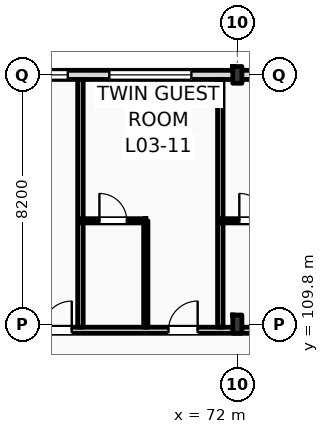
"""IFC4 building model, lengths in metres.
Left out: names, types, materials, properties, quantities, classifications, styles, units other than length and angle.
Written with IfcOpenShell. Run it as: python <this file> out.ifc"""

import sys

from ifc_helpers import new_model, si_unit, direction, frame, frame_2d, origin, origin_2d, place, context, subcontext, project, spatial, rectangle, i_section, extrude, element, fill, save


model = new_model("IFC4")
c1 = context("Model", 3, precision=1e-05, world=origin(), true_north=direction((0.0, 1.0)))
c2 = subcontext(c1, "Body", "Model", "MODEL_VIEW")
j1 = project(units=[si_unit("LENGTHUNIT", "METRE"), si_unit("PLANEANGLEUNIT", "RADIAN")], contexts=[c1])
p1 = place(None, origin())
s1 = spatial("IfcSite", under=j1, at=p1, CompositionType="ELEMENT")
p2 = place(p1, origin())
s2 = spatial("IfcBuilding", under=s1, at=p2, CompositionType="ELEMENT")
p3 = place(p2, frame((0.0, 0.0, 16.2)))
s3 = spatial("IfcBuildingStorey", under=s2, at=p3, CompositionType="ELEMENT", Elevation=16.2)
p4 = place(p3, frame((72.0, 109.8, 0.0), z_axis=(0.0, 0.0, 1.0), x_axis=(1.0, 0.0, 0.0)))
e1 = element("IfcColumn", 1, at=p4, inside=s3, PredefinedType="COLUMN", context=c2, shape_type="SweptSolid", body=[
    extrude(i_section(OverallWidth=0.3, OverallDepth=0.6, WebThickness=0.015, FlangeThickness=0.03, FilletRadius=0.027, at=origin_2d()), origin(), (0.0, 0.0, 1.0), 4.2),
])
p5 = place(p3, frame((72.0, 118.0, 0.0), z_axis=(0.0, 0.0, 1.0), x_axis=(1.0, 0.0, 0.0)))
e2 = element("IfcColumn", 2, at=p5, inside=s3, PredefinedType="COLUMN", context=c2, shape_type="SweptSolid", body=[
    extrude(i_section(OverallWidth=0.3, OverallDepth=0.55, WebThickness=0.015, FlangeThickness=0.029, FilletRadius=0.027, at=origin_2d()), origin(), (0.0, 0.0, 1.0), 4.2),
])
p6 = place(p3, frame((22.5, 118.0, 0.0), z_axis=(0.0, 0.0, 1.0), x_axis=(1.0, 0.0, 0.0)))
e3 = element("IfcWall", 3, at=p6, inside=s3, PredefinedType="STANDARD", context=c2, shape_type="SweptSolid", body=[
    extrude(rectangle(XDim=97.5, YDim=0.3, at=frame_2d((48.75, 0.0))), origin(), (0.0, 0.0, 1.0), 3.36),
])
p7 = place(p6, frame((3.721, 0.0, 0.9)))
e4 = element("IfcOpeningElement", 4, at=p7, cuts=e3, PredefinedType="OPENING", context=c2, shape_type="SweptSolid", body=[
    extrude(rectangle(XDim=0.9, YDim=1.8, at=frame_2d((0.45, 0.9))), frame((0.0, 0.16, 0.0), z_axis=(0.0, -1.0, 0.0), x_axis=(1.0, 0.0, 0.0)), (0.0, 0.0, 1.0), 0.32),
])
p8 = place(p6, frame((6.447, 0.0, 0.9)))
e5 = element("IfcOpeningElement", 5, at=p8, cuts=e3, PredefinedType="OPENING", context=c2, shape_type="SweptSolid", body=[
    extrude(rectangle(XDim=1.35, YDim=1.85, at=frame_2d((0.675, 0.925))), frame((0.0, 0.16, 0.0), z_axis=(0.0, -1.0, 0.0), x_axis=(1.0, 0.0, 0.0)), (0.0, 0.0, 1.0), 0.32),
])
p9 = place(p6, frame((11.363, 0.0, 0.9)))
e6 = element("IfcOpeningElement", 6, at=p9, cuts=e3, PredefinedType="OPENING", context=c2, shape_type="SweptSolid", body=[
    extrude(rectangle(XDim=1.5, YDim=1.9, at=frame_2d((0.75, 0.95))), frame((0.0, 0.16, 0.0), z_axis=(0.0, -1.0, 0.0), x_axis=(1.0, 0.0, 0.0)), (0.0, 0.0, 1.0), 0.32),
])
p10 = place(p6, frame((15.078, 0.0, 0.9)))
e7 = element("IfcOpeningElement", 7, at=p10, cuts=e3, PredefinedType="OPENING", context=c2, shape_type="SweptSolid", body=[
    extrude(rectangle(XDim=1.65, YDim=1.95, at=frame_2d((0.825, 0.975))), frame((0.0, 0.16, 0.0), z_axis=(0.0, -1.0, 0.0), x_axis=(1.0, 0.0, 0.0)), (0.0, 0.0, 1.0), 0.32),
])
p11 = place(p6, frame((19.395, 0.0, 0.9)))
e8 = element("IfcOpeningElement", 8, at=p11, cuts=e3, PredefinedType="OPENING", context=c2, shape_type="SweptSolid", body=[
    extrude(rectangle(XDim=1.8, YDim=2.0, at=frame_2d((0.9, 1.0))), frame((0.0, 0.16, 0.0), z_axis=(0.0, -1.0, 0.0), x_axis=(1.0, 0.0, 0.0)), (0.0, 0.0, 1.0), 0.32),
])
p12 = place(p6, frame((23.31, 0.0, 0.9)))
e9 = element("IfcOpeningElement", 9, at=p12, cuts=e3, PredefinedType="OPENING", context=c2, shape_type="SweptSolid", body=[
    extrude(rectangle(XDim=1.95, YDim=2.05, at=frame_2d((0.975, 1.025))), frame((0.0, 0.16, 0.0), z_axis=(0.0, -1.0, 0.0), x_axis=(1.0, 0.0, 0.0)), (0.0, 0.0, 1.0), 0.32),
])
p13 = place(p6, frame((28.026, 0.0, 0.9)))
e10 = element("IfcOpeningElement", 10, at=p13, cuts=e3, PredefinedType="OPENING", context=c2, shape_type="SweptSolid", body=[
    extrude(rectangle(XDim=2.1, YDim=2.1, at=frame_2d((1.05, 1.05))), frame((0.0, 0.16, 0.0), z_axis=(0.0, -1.0, 0.0), x_axis=(1.0, 0.0, 0.0)), (0.0, 0.0, 1.0), 0.32),
])
p14 = place(p6, frame((31.941, 0.0, 0.9)))
e11 = element("IfcOpeningElement", 11, at=p14, cuts=e3, PredefinedType="OPENING", context=c2, shape_type="SweptSolid", body=[
    extrude(rectangle(XDim=1.1, YDim=2.15, at=frame_2d((0.55, 1.075))), frame((0.0, 0.16, 0.0), z_axis=(0.0, -1.0, 0.0), x_axis=(1.0, 0.0, 0.0)), (0.0, 0.0, 1.0), 0.32),
])
p15 = place(p6, frame((36.657, 0.0, 0.9)))
e12 = element("IfcOpeningElement", 12, at=p15, cuts=e3, PredefinedType="OPENING", context=c2, shape_type="SweptSolid", body=[
    extrude(rectangle(XDim=2.4, YDim=2.2, at=frame_2d((1.2, 1.1))), frame((0.0, 0.16, 0.0), z_axis=(0.0, -1.0, 0.0), x_axis=(1.0, 0.0, 0.0)), (0.0, 0.0, 1.0), 0.32),
])
p16 = place(p6, frame((42.574, 0.0, 0.9)))
e13 = element("IfcOpeningElement", 13, at=p16, cuts=e3, PredefinedType="OPENING", context=c2, shape_type="SweptSolid", body=[
    extrude(rectangle(XDim=1.35, YDim=2.25, at=frame_2d((0.675, 1.125))), frame((0.0, 0.16, 0.0), z_axis=(0.0, -1.0, 0.0), x_axis=(1.0, 0.0, 0.0)), (0.0, 0.0, 1.0), 0.32),
])
p17 = place(p6, frame((45.289, 0.0, 0.9)))
e14 = element("IfcOpeningElement", 14, at=p17, cuts=e3, PredefinedType="OPENING", context=c2, shape_type="SweptSolid", body=[
    extrude(rectangle(XDim=2.7, YDim=2.28, at=frame_2d((1.35, 1.14))), frame((0.0, 0.16, 0.0), z_axis=(0.0, -1.0, 0.0), x_axis=(1.0, 0.0, 0.0)), (0.0, 0.0, 1.0), 0.32),
])
p18 = place(p6, frame((50.406, 0.0, 0.9)))
e15 = element("IfcOpeningElement", 15, at=p18, cuts=e3, PredefinedType="OPENING", context=c2, shape_type="SweptSolid", body=[
    extrude(rectangle(XDim=1.8, YDim=2.28, at=frame_2d((0.9, 1.14))), frame((0.0, 0.16, 0.0), z_axis=(0.0, -1.0, 0.0), x_axis=(1.0, 0.0, 0.0)), (0.0, 0.0, 1.0), 0.32),
])
p19 = place(p6, frame((53.922, 0.0, 0.9)))
e16 = element("IfcOpeningElement", 16, at=p19, cuts=e3, PredefinedType="OPENING", context=c2, shape_type="SweptSolid", body=[
    extrude(rectangle(XDim=1.8, YDim=2.28, at=frame_2d((0.9, 1.14))), frame((0.0, 0.16, 0.0), z_axis=(0.0, -1.0, 0.0), x_axis=(1.0, 0.0, 0.0)), (0.0, 0.0, 1.0), 0.32),
])
p20 = place(p6, frame((58.332, 0.0, 0.9)))
e17 = element("IfcOpeningElement", 17, at=p20, cuts=e3, PredefinedType="OPENING", context=c2, shape_type="SweptSolid", body=[
    extrude(rectangle(XDim=2.961, YDim=2.28, at=frame_2d((1.48, 1.14))), frame((0.0, 0.16, 0.0), z_axis=(0.0, -1.0, 0.0), x_axis=(1.0, 0.0, 0.0)), (0.0, 0.0, 1.0), 0.32),
])
p21 = place(p6, frame((62.513, 0.0, 0.9)))
e18 = element("IfcOpeningElement", 18, at=p21, cuts=e3, PredefinedType="OPENING", context=c2, shape_type="SweptSolid", body=[
    extrude(rectangle(XDim=1.8, YDim=2.28, at=frame_2d((0.9, 1.14))), frame((0.0, 0.16, 0.0), z_axis=(0.0, -1.0, 0.0), x_axis=(1.0, 0.0, 0.0)), (0.0, 0.0, 1.0), 0.32),
])
p22 = place(p6, frame((67.114, 0.0, 0.9)))
e19 = element("IfcOpeningElement", 19, at=p22, cuts=e3, PredefinedType="OPENING", context=c2, shape_type="SweptSolid", body=[
    extrude(rectangle(XDim=2.961, YDim=2.28, at=frame_2d((1.48, 1.14))), frame((0.0, 0.16, 0.0), z_axis=(0.0, -1.0, 0.0), x_axis=(1.0, 0.0, 0.0)), (0.0, 0.0, 1.0), 0.32),
])
p23 = place(p6, frame((73.695, 0.0, 0.9)))
e20 = element("IfcOpeningElement", 20, at=p23, cuts=e3, PredefinedType="OPENING", context=c2, shape_type="SweptSolid", body=[
    extrude(rectangle(XDim=1.1, YDim=2.28, at=frame_2d((0.55, 1.14))), frame((0.0, 0.16, 0.0), z_axis=(0.0, -1.0, 0.0), x_axis=(1.0, 0.0, 0.0)), (0.0, 0.0, 1.0), 0.32),
])
p24 = place(p6, frame((75.895, 0.0, 0.9)))
e21 = element("IfcOpeningElement", 21, at=p24, cuts=e3, PredefinedType="OPENING", context=c2, shape_type="SweptSolid", body=[
    extrude(rectangle(XDim=2.961, YDim=2.28, at=frame_2d((1.48, 1.14))), frame((0.0, 0.16, 0.0), z_axis=(0.0, -1.0, 0.0), x_axis=(1.0, 0.0, 0.0)), (0.0, 0.0, 1.0), 0.32),
])
p25 = place(p6, frame((81.676, 0.0, 0.9)))
e22 = element("IfcOpeningElement", 22, at=p25, cuts=e3, PredefinedType="OPENING", context=c2, shape_type="SweptSolid", body=[
    extrude(rectangle(XDim=1.8, YDim=2.28, at=frame_2d((0.9, 1.14))), frame((0.0, 0.16, 0.0), z_axis=(0.0, -1.0, 0.0), x_axis=(1.0, 0.0, 0.0)), (0.0, 0.0, 1.0), 0.32),
])
p26 = place(p6, frame((84.677, 0.0, 0.9)))
e23 = element("IfcOpeningElement", 23, at=p26, cuts=e3, PredefinedType="OPENING", context=c2, shape_type="SweptSolid", body=[
    extrude(rectangle(XDim=2.961, YDim=2.28, at=frame_2d((1.48, 1.14))), frame((0.0, 0.16, 0.0), z_axis=(0.0, -1.0, 0.0), x_axis=(1.0, 0.0, 0.0)), (0.0, 0.0, 1.0), 0.32),
])
p27 = place(p6, frame((89.999, 0.0, 0.9)))
e24 = element("IfcOpeningElement", 24, at=p27, cuts=e3, PredefinedType="OPENING", context=c2, shape_type="SweptSolid", body=[
    extrude(rectangle(XDim=1.1, YDim=1.5, at=frame_2d((0.55, 0.75))), frame((0.0, 0.16, 0.0), z_axis=(0.0, -1.0, 0.0), x_axis=(1.0, 0.0, 0.0)), (0.0, 0.0, 1.0), 0.32),
])
p28 = place(p6, frame((94.35, 0.0, 0.9)))
e25 = element("IfcOpeningElement", 25, at=p28, cuts=e3, PredefinedType="OPENING", context=c2, shape_type="SweptSolid", body=[
    extrude(rectangle(XDim=1.25, YDim=1.6, at=frame_2d((0.625, 0.8))), frame((0.0, 0.16, 0.0), z_axis=(0.0, -1.0, 0.0), x_axis=(1.0, 0.0, 0.0)), (0.0, 0.0, 1.0), 0.32),
])
p29 = place(p3, frame((10.65, 109.6, 0.0), z_axis=(0.0, 0.0, 1.0), x_axis=(1.0, 0.0, 0.0)))
e26 = element("IfcWall", 26, at=p29, inside=s3, PredefinedType="PARTITIONING", context=c2, shape_type="SweptSolid", body=[
    extrude(rectangle(XDim=109.21, YDim=0.2, at=frame_2d((54.605, 0.0))), origin(), (0.0, 0.0, 1.0), 3.36),
])
p30 = place(p29, frame((15.43, 0.0, 0.0)))
e27 = element("IfcOpeningElement", 27, at=p30, cuts=e26, PredefinedType="OPENING", context=c2, shape_type="SweptSolid", body=[
    extrude(rectangle(XDim=1.02, YDim=2.2, at=frame_2d((0.51, 1.1))), frame((0.0, 0.11, 0.0), z_axis=(0.0, -1.0, 0.0), x_axis=(1.0, 0.0, 0.0)), (0.0, 0.0, 1.0), 0.22),
])
p31 = place(p29, frame((19.537, 0.0, 0.0)))
e28 = element("IfcOpeningElement", 28, at=p31, cuts=e26, PredefinedType="OPENING", context=c2, shape_type="SweptSolid", body=[
    extrude(rectangle(XDim=1.02, YDim=2.2, at=frame_2d((0.51, 1.1))), frame((0.0, 0.11, 0.0), z_axis=(0.0, -1.0, 0.0), x_axis=(1.0, 0.0, 0.0)), (0.0, 0.0, 1.0), 0.22),
])
p32 = place(p29, frame((23.928, 0.0, 0.0)))
e29 = element("IfcOpeningElement", 29, at=p32, cuts=e26, PredefinedType="OPENING", context=c2, shape_type="SweptSolid", body=[
    extrude(rectangle(XDim=1.02, YDim=2.2, at=frame_2d((0.51, 1.1))), frame((0.0, 0.11, 0.0), z_axis=(0.0, -1.0, 0.0), x_axis=(1.0, 0.0, 0.0)), (0.0, 0.0, 1.0), 0.22),
])
p33 = place(p29, frame((26.169, 0.0, 0.0)))
e30 = element("IfcOpeningElement", 30, at=p33, cuts=e26, PredefinedType="OPENING", context=c2, shape_type="SweptSolid", body=[
    extrude(rectangle(XDim=1.02, YDim=2.2, at=frame_2d((0.51, 1.1))), frame((0.0, 0.11, 0.0), z_axis=(0.0, -1.0, 0.0), x_axis=(1.0, 0.0, 0.0)), (0.0, 0.0, 1.0), 0.22),
])
p34 = place(p29, frame((32.739, 0.0, 0.0)))
e31 = element("IfcOpeningElement", 31, at=p34, cuts=e26, PredefinedType="OPENING", context=c2, shape_type="SweptSolid", body=[
    extrude(rectangle(XDim=0.96, YDim=2.2, at=frame_2d((0.48, 1.1))), frame((0.0, 0.11, 0.0), z_axis=(0.0, -1.0, 0.0), x_axis=(1.0, 0.0, 0.0)), (0.0, 0.0, 1.0), 0.22),
])
p35 = place(p29, frame((34.98, 0.0, 0.0)))
e32 = element("IfcOpeningElement", 32, at=p35, cuts=e26, PredefinedType="OPENING", context=c2, shape_type="SweptSolid", body=[
    extrude(rectangle(XDim=0.96, YDim=2.2, at=frame_2d((0.48, 1.1))), frame((0.0, 0.11, 0.0), z_axis=(0.0, -1.0, 0.0), x_axis=(1.0, 0.0, 0.0)), (0.0, 0.0, 1.0), 0.22),
])
p36 = place(p29, frame((41.521, 0.0, 0.0)))
e33 = element("IfcOpeningElement", 33, at=p36, cuts=e26, PredefinedType="OPENING", context=c2, shape_type="SweptSolid", body=[
    extrude(rectangle(XDim=0.96, YDim=2.2, at=frame_2d((0.48, 1.1))), frame((0.0, 0.11, 0.0), z_axis=(0.0, -1.0, 0.0), x_axis=(1.0, 0.0, 0.0)), (0.0, 0.0, 1.0), 0.22),
])
p37 = place(p29, frame((43.512, 0.0, 0.0)))
e34 = element("IfcOpeningElement", 34, at=p37, cuts=e26, PredefinedType="OPENING", context=c2, shape_type="SweptSolid", body=[
    extrude(rectangle(XDim=0.96, YDim=2.2, at=frame_2d((0.48, 1.1))), frame((0.0, 0.11, 0.0), z_axis=(0.0, -1.0, 0.0), x_axis=(1.0, 0.0, 0.0)), (0.0, 0.0, 1.0), 0.22),
])
p38 = place(p29, frame((50.303, 0.0, 0.0)))
e35 = element("IfcOpeningElement", 35, at=p38, cuts=e26, PredefinedType="OPENING", context=c2, shape_type="SweptSolid", body=[
    extrude(rectangle(XDim=0.96, YDim=2.2, at=frame_2d((0.48, 1.1))), frame((0.0, 0.11, 0.0), z_axis=(0.0, -1.0, 0.0), x_axis=(1.0, 0.0, 0.0)), (0.0, 0.0, 1.0), 0.22),
])
p39 = place(p29, frame((54.944, 0.0, 0.0)))
e36 = element("IfcOpeningElement", 36, at=p39, cuts=e26, PredefinedType="OPENING", context=c2, shape_type="SweptSolid", body=[
    extrude(rectangle(XDim=0.96, YDim=2.2, at=frame_2d((0.48, 1.1))), frame((0.0, 0.11, 0.0), z_axis=(0.0, -1.0, 0.0), x_axis=(1.0, 0.0, 0.0)), (0.0, 0.0, 1.0), 0.22),
])
p40 = place(p29, frame((59.085, 0.0, 0.0)))
e37 = element("IfcOpeningElement", 37, at=p40, cuts=e26, PredefinedType="OPENING", context=c2, shape_type="SweptSolid", body=[
    extrude(rectangle(XDim=0.96, YDim=2.2, at=frame_2d((0.48, 1.1))), frame((0.0, 0.11, 0.0), z_axis=(0.0, -1.0, 0.0), x_axis=(1.0, 0.0, 0.0)), (0.0, 0.0, 1.0), 0.22),
])
p41 = place(p29, frame((63.476, 0.0, 0.0)))
e38 = element("IfcOpeningElement", 38, at=p41, cuts=e26, PredefinedType="OPENING", context=c2, shape_type="SweptSolid", body=[
    extrude(rectangle(XDim=0.96, YDim=2.2, at=frame_2d((0.48, 1.1))), frame((0.0, 0.11, 0.0), z_axis=(0.0, -1.0, 0.0), x_axis=(1.0, 0.0, 0.0)), (0.0, 0.0, 1.0), 0.22),
])
p42 = place(p29, frame((65.716, 0.0, 0.0)))
e39 = element("IfcOpeningElement", 39, at=p42, cuts=e26, PredefinedType="OPENING", context=c2, shape_type="SweptSolid", body=[
    extrude(rectangle(XDim=0.96, YDim=2.2, at=frame_2d((0.48, 1.1))), frame((0.0, 0.11, 0.0), z_axis=(0.0, -1.0, 0.0), x_axis=(1.0, 0.0, 0.0)), (0.0, 0.0, 1.0), 0.22),
])
p43 = place(p29, frame((72.257, 0.0, 0.0)))
e40 = element("IfcOpeningElement", 40, at=p43, cuts=e26, PredefinedType="OPENING", context=c2, shape_type="SweptSolid", body=[
    extrude(rectangle(XDim=0.96, YDim=2.2, at=frame_2d((0.48, 1.1))), frame((0.0, 0.11, 0.0), z_axis=(0.0, -1.0, 0.0), x_axis=(1.0, 0.0, 0.0)), (0.0, 0.0, 1.0), 0.22),
])
p44 = place(p29, frame((74.498, 0.0, 0.0)))
e41 = element("IfcOpeningElement", 41, at=p44, cuts=e26, PredefinedType="OPENING", context=c2, shape_type="SweptSolid", body=[
    extrude(rectangle(XDim=0.96, YDim=2.2, at=frame_2d((0.48, 1.1))), frame((0.0, 0.11, 0.0), z_axis=(0.0, -1.0, 0.0), x_axis=(1.0, 0.0, 0.0)), (0.0, 0.0, 1.0), 0.22),
])
p45 = place(p29, frame((81.039, 0.0, 0.0)))
e42 = element("IfcOpeningElement", 42, at=p45, cuts=e26, PredefinedType="OPENING", context=c2, shape_type="SweptSolid", body=[
    extrude(rectangle(XDim=0.96, YDim=2.2, at=frame_2d((0.48, 1.1))), frame((0.0, 0.11, 0.0), z_axis=(0.0, -1.0, 0.0), x_axis=(1.0, 0.0, 0.0)), (0.0, 0.0, 1.0), 0.22),
])
p46 = place(p29, frame((85.68, 0.0, 0.0)))
e43 = element("IfcOpeningElement", 43, at=p46, cuts=e26, PredefinedType="OPENING", context=c2, shape_type="SweptSolid", body=[
    extrude(rectangle(XDim=0.96, YDim=2.2, at=frame_2d((0.48, 1.1))), frame((0.0, 0.11, 0.0), z_axis=(0.0, -1.0, 0.0), x_axis=(1.0, 0.0, 0.0)), (0.0, 0.0, 1.0), 0.22),
])
p47 = place(p29, frame((89.82, 0.0, 0.0)))
e44 = element("IfcOpeningElement", 44, at=p47, cuts=e26, PredefinedType="OPENING", context=c2, shape_type="SweptSolid", body=[
    extrude(rectangle(XDim=0.96, YDim=2.2, at=frame_2d((0.48, 1.1))), frame((0.0, 0.11, 0.0), z_axis=(0.0, -1.0, 0.0), x_axis=(1.0, 0.0, 0.0)), (0.0, 0.0, 1.0), 0.22),
])
p48 = place(p29, frame((94.211, 0.0, 0.0)))
e45 = element("IfcOpeningElement", 45, at=p48, cuts=e26, PredefinedType="OPENING", context=c2, shape_type="SweptSolid", body=[
    extrude(rectangle(XDim=0.96, YDim=2.2, at=frame_2d((0.48, 1.1))), frame((0.0, 0.11, 0.0), z_axis=(0.0, -1.0, 0.0), x_axis=(1.0, 0.0, 0.0)), (0.0, 0.0, 1.0), 0.22),
])
p49 = place(p29, frame((98.602, 0.0, 0.0)))
e46 = element("IfcOpeningElement", 46, at=p49, cuts=e26, PredefinedType="OPENING", context=c2, shape_type="SweptSolid", body=[
    extrude(rectangle(XDim=0.96, YDim=2.2, at=frame_2d((0.48, 1.1))), frame((0.0, 0.11, 0.0), z_axis=(0.0, -1.0, 0.0), x_axis=(1.0, 0.0, 0.0)), (0.0, 0.0, 1.0), 0.22),
])
p50 = place(p29, frame((102.993, 0.0, 0.0)))
e47 = element("IfcOpeningElement", 47, at=p50, cuts=e26, PredefinedType="OPENING", context=c2, shape_type="SweptSolid", body=[
    extrude(rectangle(XDim=0.96, YDim=2.2, at=frame_2d((0.48, 1.1))), frame((0.0, 0.11, 0.0), z_axis=(0.0, -1.0, 0.0), x_axis=(1.0, 0.0, 0.0)), (0.0, 0.0, 1.0), 0.22),
])
p51 = place(p29, frame((105.269, 0.0, 0.0)))
e48 = element("IfcOpeningElement", 48, at=p51, cuts=e26, PredefinedType="OPENING", context=c2, shape_type="SweptSolid", body=[
    extrude(rectangle(XDim=0.96, YDim=2.2, at=frame_2d((0.48, 1.1))), frame((0.0, 0.11, 0.0), z_axis=(0.0, -1.0, 0.0), x_axis=(1.0, 0.0, 0.0)), (0.0, 0.0, 1.0), 0.22),
])
p52 = place(p29, frame((2.716, 0.0, 0.0)))
e49 = element("IfcOpeningElement", 49, at=p52, cuts=e26, PredefinedType="OPENING", context=c2, shape_type="SweptSolid", body=[
    extrude(rectangle(XDim=1.35, YDim=2.25, at=frame_2d((0.675, 1.125))), frame((0.0, 0.11, 0.0), z_axis=(0.0, -1.0, 0.0), x_axis=(1.0, 0.0, 0.0)), (0.0, 0.0, 1.0), 0.22),
])
p53 = place(p29, frame((6.65, 0.0, 0.0)))
e50 = element("IfcOpeningElement", 50, at=p53, cuts=e26, PredefinedType="OPENING", context=c2, shape_type="SweptSolid", body=[
    extrude(rectangle(XDim=1.35, YDim=2.25, at=frame_2d((0.675, 1.125))), frame((0.0, 0.11, 0.0), z_axis=(0.0, -1.0, 0.0), x_axis=(1.0, 0.0, 0.0)), (0.0, 0.0, 1.0), 0.22),
])
p54 = place(p29, frame((10.583, 0.0, 0.0)))
e51 = element("IfcOpeningElement", 51, at=p54, cuts=e26, PredefinedType="OPENING", context=c2, shape_type="SweptSolid", body=[
    extrude(rectangle(XDim=1.35, YDim=2.25, at=frame_2d((0.675, 1.125))), frame((0.0, 0.11, 0.0), z_axis=(0.0, -1.0, 0.0), x_axis=(1.0, 0.0, 0.0)), (0.0, 0.0, 1.0), 0.22),
])
p55 = place(p3, frame((66.839, 109.7, 0.0), z_axis=(0.0, 0.0, 1.0), x_axis=(0.0, 1.0, 0.0)))
e52 = element("IfcWall", 52, at=p55, inside=s3, PredefinedType="PARTITIONING", context=c2, shape_type="SweptSolid", body=[
    extrude(rectangle(XDim=8.15, YDim=0.18, at=frame_2d((4.075, 0.0))), origin(), (0.0, 0.0, 1.0), 3.61),
])
p56 = place(p3, frame((71.44, 109.7, 0.0), z_axis=(0.0, 0.0, 1.0), x_axis=(0.0, 1.0, 0.0)))
e53 = element("IfcWall", 53, at=p56, inside=s3, PredefinedType="PARTITIONING", context=c2, shape_type="SweptSolid", body=[
    extrude(rectangle(XDim=8.15, YDim=0.18, at=frame_2d((4.075, 0.0))), origin(), (0.0, 0.0, 1.0), 3.92),
])
p57 = place(p3, frame((68.989, 109.7, 0.0), z_axis=(0.0, 0.0, 1.0), x_axis=(0.0, 1.0, 0.0)))
e54 = element("IfcWall", 54, at=p57, inside=s3, PredefinedType="PARTITIONING", context=c2, shape_type="SweptSolid", body=[
    extrude(rectangle(XDim=3.5, YDim=0.14, at=frame_2d((1.75, 0.0))), origin(), (0.0, 0.0, 1.0), 3.92),
])
p58 = place(p3, frame((66.839, 113.2, 0.0), z_axis=(0.0, 0.0, 1.0), x_axis=(1.0, 0.0, 0.0)))
e55 = element("IfcWall", 55, at=p58, inside=s3, PredefinedType="PARTITIONING", context=c2, shape_type="SweptSolid", body=[
    extrude(rectangle(XDim=2.15, YDim=0.14, at=frame_2d((1.075, 0.0))), origin(), (0.0, 0.0, 1.0), 3.92),
])
p59 = place(p58, frame((0.625, 0.0, 0.0)))
e56 = element("IfcOpeningElement", 56, at=p59, cuts=e55, PredefinedType="OPENING", context=c2, shape_type="SweptSolid", body=[
    extrude(rectangle(XDim=0.9, YDim=2.1, at=frame_2d((0.45, 1.05))), frame((0.0, 0.08, 0.0), z_axis=(0.0, -1.0, 0.0), x_axis=(1.0, 0.0, 0.0)), (0.0, 0.0, 1.0), 0.16),
])
p60 = place(p3, frame((71.44, 113.2, 0.0), z_axis=(0.0, 0.0, 1.0), x_axis=(1.0, 0.0, 0.0)))
e57 = element("IfcWall", 57, at=p60, inside=s3, PredefinedType="PARTITIONING", context=c2, shape_type="SweptSolid", body=[
    extrude(rectangle(XDim=2.15, YDim=0.14, at=frame_2d((1.075, 0.0))), origin(), (0.0, 0.0, 1.0), 3.92),
])
p61 = place(p60, frame((0.625, 0.0, 0.0)))
e58 = element("IfcOpeningElement", 58, at=p61, cuts=e57, PredefinedType="OPENING", context=c2, shape_type="SweptSolid", body=[
    extrude(rectangle(XDim=0.9, YDim=2.1, at=frame_2d((0.45, 1.05))), frame((0.0, 0.08, 0.0), z_axis=(0.0, -1.0, 0.0), x_axis=(1.0, 0.0, 0.0)), (0.0, 0.0, 1.0), 0.16),
])
p62 = place(p16, origin())
e59 = element("IfcWindow", 59, at=p62, inside=s3, PartitioningType="DOUBLE_PANEL_VERTICAL", PredefinedType="WINDOW", context=c2, shape_type="SweptSolid", body=[
    extrude(rectangle(XDim=1.35, YDim=2.25, at=frame_2d((0.675, 1.125))), frame((0.0, 0.03, 0.0), z_axis=(0.0, -1.0, 0.0), x_axis=(1.0, 0.0, 0.0)), (0.0, 0.0, 1.0), 0.06),
])
fill(e13, e59)
p63 = place(p17, origin())
e60 = element("IfcWindow", 60, at=p63, inside=s3, PartitioningType="DOUBLE_PANEL_VERTICAL", PredefinedType="WINDOW", context=c2, shape_type="SweptSolid", body=[
    extrude(rectangle(XDim=2.7, YDim=2.28, at=frame_2d((1.35, 1.14))), frame((0.0, 0.03, 0.0), z_axis=(0.0, -1.0, 0.0), x_axis=(1.0, 0.0, 0.0)), (0.0, 0.0, 1.0), 0.06),
])
fill(e14, e60)
p64 = place(p39, origin())
e61 = element("IfcDoor", 61, at=p64, inside=s3, OperationType="SINGLE_SWING_RIGHT", PredefinedType="DOOR", context=c2, shape_type="SweptSolid", body=[
    extrude(rectangle(XDim=0.96, YDim=2.2, at=frame_2d((0.48, 1.1))), frame((0.0, 0.025, 0.0), z_axis=(0.0, -1.0, 0.0), x_axis=(1.0, 0.0, 0.0)), (0.0, 0.0, 1.0), 0.05),
])
fill(e36, e61)
p65 = place(p40, origin())
e62 = element("IfcDoor", 62, at=p65, inside=s3, OperationType="SINGLE_SWING_RIGHT", PredefinedType="DOOR", context=c2, shape_type="SweptSolid", body=[
    extrude(rectangle(XDim=0.96, YDim=2.2, at=frame_2d((0.48, 1.1))), frame((0.0, 0.025, 0.0), z_axis=(0.0, -1.0, 0.0), x_axis=(1.0, 0.0, 0.0)), (0.0, 0.0, 1.0), 0.05),
])
fill(e37, e62)
p66 = place(p59, origin())
e63 = element("IfcDoor", 63, at=p66, inside=s3, OperationType="SINGLE_SWING_LEFT", PredefinedType="DOOR", context=c2, shape_type="SweptSolid", body=[
    extrude(rectangle(XDim=0.9, YDim=2.1, at=frame_2d((0.45, 1.05))), frame((0.0, 0.025, 0.0), z_axis=(0.0, -1.0, 0.0), x_axis=(1.0, 0.0, 0.0)), (0.0, 0.0, 1.0), 0.05),
])
fill(e56, e63)
p67 = place(p61, origin())
e64 = element("IfcDoor", 64, at=p67, inside=s3, OperationType="SINGLE_SWING_LEFT", PredefinedType="DOOR", context=c2, shape_type="SweptSolid", body=[
    extrude(rectangle(XDim=0.9, YDim=2.1, at=frame_2d((0.45, 1.05))), frame((0.0, 0.025, 0.0), z_axis=(0.0, -1.0, 0.0), x_axis=(1.0, 0.0, 0.0)), (0.0, 0.0, 1.0), 0.05),
])
fill(e58, e64)
save(model, sys.argv[1])
